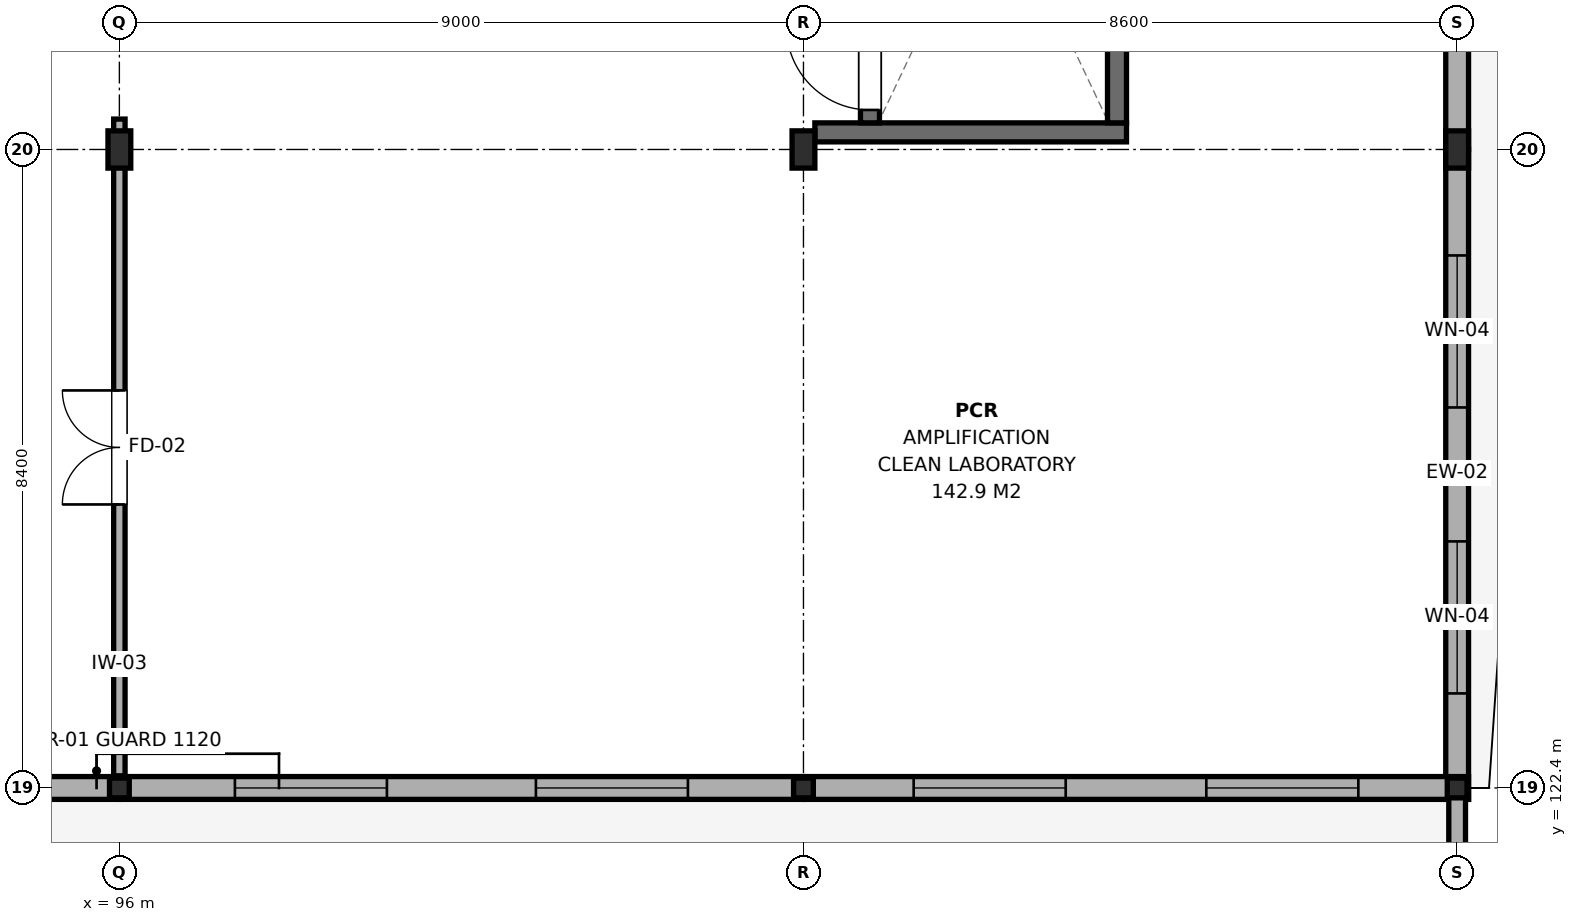
"""IFC4 building model, lengths in metres.
Left out: names, types, materials, properties, quantities, classifications, styles, units other than length and angle.
Written with IfcOpenShell. Run it as: python <this file> out.ifc"""

import sys

from ifc_helpers import new_model, si_unit, direction, frame, frame_2d, origin, origin_2d, place, context, subcontext, project, spatial, rectangle, i_section, extrude, element, fill, save


model = new_model("IFC4")
c1 = context("Model", 3, precision=1e-05, world=origin(), true_north=direction((0.0, 1.0)))
c2 = subcontext(c1, "Body", "Model", "MODEL_VIEW")
j1 = project(units=[si_unit("LENGTHUNIT", "METRE"), si_unit("PLANEANGLEUNIT", "RADIAN")], contexts=[c1])
p1 = place(None, origin())
s1 = spatial("IfcSite", under=j1, at=p1, CompositionType="ELEMENT")
p2 = place(p1, origin())
s2 = spatial("IfcBuilding", under=s1, at=p2, CompositionType="ELEMENT")
p3 = place(p2, frame((0.0, 0.0, 13.2)))
s3 = spatial("IfcBuildingStorey", under=s2, at=p3, CompositionType="ELEMENT", Elevation=13.2)
p4 = place(p3, frame((96.0, 122.4, 0.0), z_axis=(0.0, 0.0, 1.0), x_axis=(1.0, 0.0, 0.0)))
e1 = element("IfcColumn", 1, at=p4, inside=s3, PredefinedType="COLUMN", context=c2, shape_type="SweptSolid", body=[
    extrude(i_section(OverallWidth=0.26, OverallDepth=0.26, WebThickness=0.01, FlangeThickness=0.018, FilletRadius=0.024, at=origin_2d()), origin(), (0.0, 0.0, 1.0), 3.9),
])
p5 = place(p3, frame((96.0, 130.8, 0.0), z_axis=(0.0, 0.0, 1.0), x_axis=(1.0, 0.0, 0.0)))
e2 = element("IfcColumn", 2, at=p5, inside=s3, PredefinedType="COLUMN", context=c2, shape_type="SweptSolid", body=[
    extrude(i_section(OverallWidth=0.3, OverallDepth=0.49, WebThickness=0.012, FlangeThickness=0.023, FilletRadius=0.027, at=origin_2d()), origin(), (0.0, 0.0, 1.0), 3.9),
])
p6 = place(p3, frame((105.0, 122.4, 0.0), z_axis=(0.0, 0.0, 1.0), x_axis=(1.0, 0.0, 0.0)))
e3 = element("IfcColumn", 3, at=p6, inside=s3, PredefinedType="COLUMN", context=c2, shape_type="SweptSolid", body=[
    extrude(i_section(OverallWidth=0.26, OverallDepth=0.26, WebThickness=0.01, FlangeThickness=0.018, FilletRadius=0.024, at=origin_2d()), origin(), (0.0, 0.0, 1.0), 3.9),
])
p7 = place(p3, frame((105.0, 130.8, 0.0), z_axis=(0.0, 0.0, 1.0), x_axis=(1.0, 0.0, 0.0)))
e4 = element("IfcColumn", 4, at=p7, inside=s3, PredefinedType="COLUMN", context=c2, shape_type="SweptSolid", body=[
    extrude(i_section(OverallWidth=0.3, OverallDepth=0.49, WebThickness=0.012, FlangeThickness=0.023, FilletRadius=0.027, at=origin_2d()), origin(), (0.0, 0.0, 1.0), 3.9),
])
p8 = place(p3, frame((113.6, 122.4, 0.0), z_axis=(0.0, 0.0, 1.0), x_axis=(1.0, 0.0, 0.0)))
e5 = element("IfcColumn", 5, at=p8, inside=s3, PredefinedType="COLUMN", context=c2, shape_type="SweptSolid", body=[
    extrude(i_section(OverallWidth=0.26, OverallDepth=0.26, WebThickness=0.01, FlangeThickness=0.018, FilletRadius=0.024, at=origin_2d()), origin(), (0.0, 0.0, 1.0), 3.9),
])
p9 = place(p3, frame((113.6, 130.8, 0.0), z_axis=(0.0, 0.0, 1.0), x_axis=(1.0, 0.0, 0.0)))
e6 = element("IfcColumn", 6, at=p9, inside=s3, PredefinedType="COLUMN", context=c2, shape_type="SweptSolid", body=[
    extrude(i_section(OverallWidth=0.3, OverallDepth=0.49, WebThickness=0.012, FlangeThickness=0.023, FilletRadius=0.027, at=origin_2d()), origin(), (0.0, 0.0, 1.0), 3.9),
])
p10 = place(p3, frame((105.15, 131.025, 0.0), z_axis=(0.0, 0.0, 1.0), x_axis=(1.0, 0.0, 0.0)))
e7 = element("IfcWall", 7, at=p10, inside=s3, PredefinedType="SHEAR", context=c2, shape_type="SweptSolid", body=[
    extrude(rectangle(XDim=4.1, YDim=0.25, at=frame_2d((2.05, 0.0))), origin(), (0.0, 0.0, 1.0), 3.7),
])
p11 = place(p3, frame((105.875, 131.15, 0.0), z_axis=(0.0, 0.0, 1.0), x_axis=(0.0, 1.0, 0.0)))
e8 = element("IfcWall", 8, at=p11, inside=s3, PredefinedType="SHEAR", context=c2, shape_type="SweptSolid", body=[
    extrude(rectangle(XDim=6.4, YDim=0.25, at=frame_2d((3.2, 0.0))), origin(), (0.0, 0.0, 1.0), 3.7),
])
p12 = place(p11, frame((0.17, 0.0, 0.0)))
e9 = element("IfcOpeningElement", 9, at=p12, cuts=e8, PredefinedType="OPENING", context=c2, shape_type="SweptSolid", body=[
    extrude(rectangle(XDim=1.1, YDim=2.15, at=frame_2d((0.55, 1.075))), frame((0.0, 0.14, 0.0), z_axis=(0.0, -1.0, 0.0), x_axis=(1.0, 0.0, 0.0)), (0.0, 0.0, 1.0), 0.28),
])
p13 = place(p3, frame((109.125, 131.15, 0.0), z_axis=(0.0, 0.0, 1.0), x_axis=(0.0, 1.0, 0.0)))
e10 = element("IfcWall", 10, at=p13, inside=s3, PredefinedType="SHEAR", context=c2, shape_type="SweptSolid", body=[
    extrude(rectangle(XDim=6.4, YDim=0.25, at=frame_2d((3.2, 0.0))), origin(), (0.0, 0.0, 1.0), 3.7),
])
p14 = place(p3, frame((113.6, 122.25, 0.0), z_axis=(0.0, 0.0, 1.0), x_axis=(0.0, 1.0, 0.0)))
e11 = element("IfcWall", 11, at=p14, inside=s3, PredefinedType="SOLIDWALL", context=c2, shape_type="SweptSolid", body=[
    extrude(rectangle(XDim=8.55, YDim=0.3, at=frame_2d((4.275, 0.0))), origin(), (0.0, 0.0, 1.0), 3.095),
])
p15 = place(p14, frame((1.394, 0.0, 0.65)))
e12 = element("IfcOpeningElement", 12, at=p15, cuts=e11, PredefinedType="OPENING", context=c2, shape_type="SweptSolid", body=[
    extrude(rectangle(XDim=2.0, YDim=1.8, at=frame_2d((1.0, 0.9))), frame((0.0, 0.165, 0.0), z_axis=(0.0, -1.0, 0.0), x_axis=(1.0, 0.0, 0.0)), (0.0, 0.0, 1.0), 0.33),
])
p16 = place(p14, frame((5.156, 0.0, 0.65)))
e13 = element("IfcOpeningElement", 13, at=p16, cuts=e11, PredefinedType="OPENING", context=c2, shape_type="SweptSolid", body=[
    extrude(rectangle(XDim=2.0, YDim=1.8, at=frame_2d((1.0, 0.9))), frame((0.0, 0.165, 0.0), z_axis=(0.0, -1.0, 0.0), x_axis=(1.0, 0.0, 0.0)), (0.0, 0.0, 1.0), 0.33),
])
p17 = place(p3, frame((113.6, 130.8, 0.0), z_axis=(0.0, 0.0, 1.0), x_axis=(0.0, 1.0, 0.0)))
e14 = element("IfcWall", 14, at=p17, inside=s3, PredefinedType="SOLIDWALL", context=c2, shape_type="SweptSolid", body=[
    extrude(rectangle(XDim=7.2, YDim=0.3, at=frame_2d((3.6, 0.0))), origin(), (0.0, 0.0, 1.0), 3.095),
])
p18 = place(p17, frame((2.7, 0.0, 0.65)))
e15 = element("IfcOpeningElement", 15, at=p18, cuts=e14, PredefinedType="OPENING", context=c2, shape_type="SweptSolid", body=[
    extrude(rectangle(XDim=1.8, YDim=1.2, at=frame_2d((0.9, 0.6))), frame((0.0, 0.165, 0.0), z_axis=(0.0, -1.0, 0.0), x_axis=(1.0, 0.0, 0.0)), (0.0, 0.0, 1.0), 0.33),
])
p19 = place(p3, frame((87.0, 122.4, 0.0), z_axis=(0.0, 0.0, 1.0), x_axis=(1.0, 0.0, 0.0)))
e16 = element("IfcWall", 16, at=p19, inside=s3, PredefinedType="SOLIDWALL", context=c2, shape_type="SweptSolid", body=[
    extrude(rectangle(XDim=9.0, YDim=0.3, at=frame_2d((4.5, 0.0))), origin(), (0.0, 0.0, 1.0), 3.205),
])
p20 = place(p19, frame((6.2, 0.0, 0.0)))
e17 = element("IfcOpeningElement", 17, at=p20, cuts=e16, PredefinedType="OPENING", context=c2, shape_type="SweptSolid", body=[
    extrude(rectangle(XDim=1.8, YDim=2.2, at=frame_2d((0.9, 1.1))), frame((0.0, 0.165, 0.0), z_axis=(0.0, -1.0, 0.0), x_axis=(1.0, 0.0, 0.0)), (0.0, 0.0, 1.0), 0.33),
])
p21 = place(p3, frame((96.0, 122.4, 0.0), z_axis=(0.0, 0.0, 1.0), x_axis=(1.0, 0.0, 0.0)))
e18 = element("IfcWall", 18, at=p21, inside=s3, PredefinedType="SOLIDWALL", context=c2, shape_type="SweptSolid", body=[
    extrude(rectangle(XDim=9.0, YDim=0.3, at=frame_2d((4.5, 0.0))), origin(), (0.0, 0.0, 1.0), 3.255),
])
p22 = place(p21, frame((1.52, 0.0, 0.65)))
e19 = element("IfcOpeningElement", 19, at=p22, cuts=e18, PredefinedType="OPENING", context=c2, shape_type="SweptSolid", body=[
    extrude(rectangle(XDim=2.0, YDim=1.8, at=frame_2d((1.0, 0.9))), frame((0.0, 0.165, 0.0), z_axis=(0.0, -1.0, 0.0), x_axis=(1.0, 0.0, 0.0)), (0.0, 0.0, 1.0), 0.33),
])
p23 = place(p21, frame((5.48, 0.0, 0.65)))
e20 = element("IfcOpeningElement", 20, at=p23, cuts=e18, PredefinedType="OPENING", context=c2, shape_type="SweptSolid", body=[
    extrude(rectangle(XDim=2.0, YDim=1.8, at=frame_2d((1.0, 0.9))), frame((0.0, 0.165, 0.0), z_axis=(0.0, -1.0, 0.0), x_axis=(1.0, 0.0, 0.0)), (0.0, 0.0, 1.0), 0.33),
])
p24 = place(p3, frame((105.0, 122.4, 0.0), z_axis=(0.0, 0.0, 1.0), x_axis=(1.0, 0.0, 0.0)))
e21 = element("IfcWall", 21, at=p24, inside=s3, PredefinedType="SOLIDWALL", context=c2, shape_type="SweptSolid", body=[
    extrude(rectangle(XDim=8.75, YDim=0.3, at=frame_2d((4.375, 0.0))), origin(), (0.0, 0.0, 1.0), 3.305),
])
p25 = place(p24, frame((1.45, 0.0, 0.65)))
e22 = element("IfcOpeningElement", 22, at=p25, cuts=e21, PredefinedType="OPENING", context=c2, shape_type="SweptSolid", body=[
    extrude(rectangle(XDim=2.0, YDim=1.8, at=frame_2d((1.0, 0.9))), frame((0.0, 0.165, 0.0), z_axis=(0.0, -1.0, 0.0), x_axis=(1.0, 0.0, 0.0)), (0.0, 0.0, 1.0), 0.33),
])
p26 = place(p24, frame((5.3, 0.0, 0.65)))
e23 = element("IfcOpeningElement", 23, at=p26, cuts=e21, PredefinedType="OPENING", context=c2, shape_type="SweptSolid", body=[
    extrude(rectangle(XDim=2.0, YDim=1.8, at=frame_2d((1.0, 0.9))), frame((0.0, 0.165, 0.0), z_axis=(0.0, -1.0, 0.0), x_axis=(1.0, 0.0, 0.0)), (0.0, 0.0, 1.0), 0.33),
])
p27 = place(p3, frame((113.6, 96.0, 0.0), z_axis=(0.0, 0.0, 1.0), x_axis=(0.0, 1.0, 0.0)))
e24 = element("IfcWall", 24, at=p27, inside=s3, PredefinedType="PARAPET", context=c2, shape_type="SweptSolid", body=[
    extrude(rectangle(XDim=26.4, YDim=0.22, at=frame_2d((13.2, 0.0))), origin(), (0.0, 0.0, 1.0), 1.15),
])
p28 = place(p3, frame((96.0, 122.56, 0.0), z_axis=(0.0, 0.0, 1.0), x_axis=(0.0, 1.0, 0.0)))
e25 = element("IfcWall", 25, at=p28, inside=s3, PredefinedType="PARTITIONING", context=c2, shape_type="SweptSolid", body=[
    extrude(rectangle(XDim=8.64, YDim=0.15, at=frame_2d((4.32, 0.0))), origin(), (0.0, 0.0, 1.0), 3.095),
])
p29 = place(p28, frame((3.57, 0.0, 0.0)))
e26 = element("IfcOpeningElement", 26, at=p29, cuts=e25, PredefinedType="OPENING", context=c2, shape_type="SweptSolid", body=[
    extrude(rectangle(XDim=1.5, YDim=2.15, at=frame_2d((0.75, 1.075))), frame((0.0, 0.09, 0.0), z_axis=(0.0, -1.0, 0.0), x_axis=(1.0, 0.0, 0.0)), (0.0, 0.0, 1.0), 0.18),
])
p30 = place(p15, origin())
e27 = element("IfcWindow", 27, at=p30, inside=s3, PartitioningType="SINGLE_PANEL", PredefinedType="WINDOW", context=c2, shape_type="SweptSolid", body=[
    extrude(rectangle(XDim=2.0, YDim=1.8, at=frame_2d((1.0, 0.9))), frame((0.0, 0.03, 0.0), z_axis=(0.0, -1.0, 0.0), x_axis=(1.0, 0.0, 0.0)), (0.0, 0.0, 1.0), 0.06),
])
fill(e12, e27)
p31 = place(p16, origin())
e28 = element("IfcWindow", 28, at=p31, inside=s3, PartitioningType="SINGLE_PANEL", PredefinedType="WINDOW", context=c2, shape_type="SweptSolid", body=[
    extrude(rectangle(XDim=2.0, YDim=1.8, at=frame_2d((1.0, 0.9))), frame((0.0, 0.03, 0.0), z_axis=(0.0, -1.0, 0.0), x_axis=(1.0, 0.0, 0.0)), (0.0, 0.0, 1.0), 0.06),
])
fill(e13, e28)
p32 = place(p22, origin())
e29 = element("IfcWindow", 29, at=p32, inside=s3, PartitioningType="SINGLE_PANEL", PredefinedType="WINDOW", context=c2, shape_type="SweptSolid", body=[
    extrude(rectangle(XDim=2.0, YDim=1.8, at=frame_2d((1.0, 0.9))), frame((0.0, 0.03, 0.0), z_axis=(0.0, -1.0, 0.0), x_axis=(1.0, 0.0, 0.0)), (0.0, 0.0, 1.0), 0.06),
])
fill(e19, e29)
p33 = place(p23, origin())
e30 = element("IfcWindow", 30, at=p33, inside=s3, PartitioningType="SINGLE_PANEL", PredefinedType="WINDOW", context=c2, shape_type="SweptSolid", body=[
    extrude(rectangle(XDim=2.0, YDim=1.8, at=frame_2d((1.0, 0.9))), frame((0.0, 0.03, 0.0), z_axis=(0.0, -1.0, 0.0), x_axis=(1.0, 0.0, 0.0)), (0.0, 0.0, 1.0), 0.06),
])
fill(e20, e30)
p34 = place(p25, origin())
e31 = element("IfcWindow", 31, at=p34, inside=s3, PartitioningType="SINGLE_PANEL", PredefinedType="WINDOW", context=c2, shape_type="SweptSolid", body=[
    extrude(rectangle(XDim=2.0, YDim=1.8, at=frame_2d((1.0, 0.9))), frame((0.0, 0.03, 0.0), z_axis=(0.0, -1.0, 0.0), x_axis=(1.0, 0.0, 0.0)), (0.0, 0.0, 1.0), 0.06),
])
fill(e22, e31)
p35 = place(p26, origin())
e32 = element("IfcWindow", 32, at=p35, inside=s3, PartitioningType="SINGLE_PANEL", PredefinedType="WINDOW", context=c2, shape_type="SweptSolid", body=[
    extrude(rectangle(XDim=2.0, YDim=1.8, at=frame_2d((1.0, 0.9))), frame((0.0, 0.03, 0.0), z_axis=(0.0, -1.0, 0.0), x_axis=(1.0, 0.0, 0.0)), (0.0, 0.0, 1.0), 0.06),
])
fill(e23, e32)
p36 = place(p12, origin())
e33 = element("IfcDoor", 33, at=p36, inside=s3, OperationType="SINGLE_SWING_RIGHT", PredefinedType="DOOR", context=c2, shape_type="SweptSolid", body=[
    extrude(rectangle(XDim=1.1, YDim=2.15, at=frame_2d((0.55, 1.075))), frame((0.0, 0.025, 0.0), z_axis=(0.0, -1.0, 0.0), x_axis=(1.0, 0.0, 0.0)), (0.0, 0.0, 1.0), 0.05),
])
fill(e9, e33)
p37 = place(p29, origin())
e34 = element("IfcDoor", 34, at=p37, inside=s3, OperationType="DOUBLE_DOOR_SINGLE_SWING", PredefinedType="DOOR", context=c2, shape_type="SweptSolid", body=[
    extrude(rectangle(XDim=1.5, YDim=2.15, at=frame_2d((0.75, 1.075))), frame((0.0, 0.025, 0.0), z_axis=(0.0, -1.0, 0.0), x_axis=(1.0, 0.0, 0.0)), (0.0, 0.0, 1.0), 0.05),
])
fill(e26, e34)
save(model, sys.argv[1])
